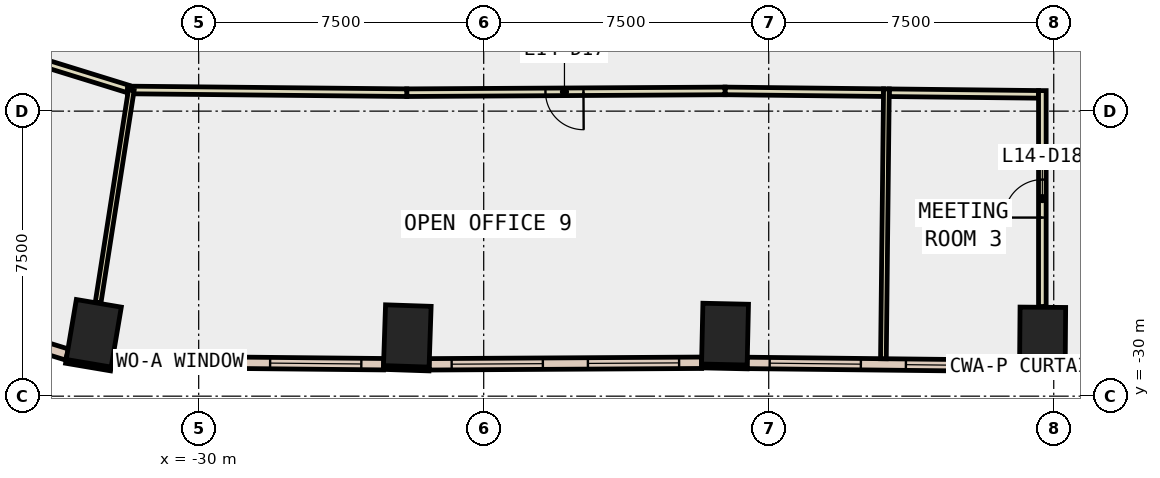
"""IFC4 building model, lengths in metres.
Left out: names, types, materials, properties, quantities, classifications, styles, units other than length and angle.
Written with IfcOpenShell. Run it as: python <this file> out.ifc"""

import sys

from ifc_helpers import new_model, si_unit, direction, frame, frame_2d, origin, origin_2d, place, context, subcontext, project, spatial, rectangle, extrude, element, fill, save


model = new_model("IFC4")
c1 = context("Model", 3, precision=1e-05, world=origin(), true_north=direction((0.0, 1.0)))
c2 = subcontext(c1, "Body", "Model", "MODEL_VIEW")
j1 = project(units=[si_unit("LENGTHUNIT", "METRE"), si_unit("PLANEANGLEUNIT", "RADIAN")], contexts=[c1])
p1 = place(None, origin())
s1 = spatial("IfcSite", under=j1, at=p1, CompositionType="ELEMENT")
p2 = place(p1, origin())
s2 = spatial("IfcBuilding", under=s1, at=p2, CompositionType="ELEMENT")
p3 = place(p2, frame((0.0, 0.0, 68.6)))
s3 = spatial("IfcBuildingStorey", under=s2, at=p3, CompositionType="ELEMENT", Elevation=68.6)
for number, where, z_axis, x_axis in (
    (1, (-32.761, -28.346, -0.4), (0.0, 0.0, 1.0), (-0.986, 0.167, 0.0)),
    (2, (-24.51, -28.416, -0.4), (0.0, 0.0, 1.0), (-0.999, 0.034, 0.0)),
    (3, (-16.15, -28.368, -0.4), (0.0, 0.0, 1.0), (-1.0, 0.022, 0.0)),
    (4, (-7.793, -28.461, -0.4), (0.0, 0.0, 1.0), (-1.0, 0.008, 0.0)),
):
    element("IfcColumn", number, at=place(p3, frame(where, z_axis=z_axis, x_axis=x_axis)), inside=s3, PredefinedType="COLUMN", context=c2, shape_type="SweptSolid", body=[
        extrude(rectangle(XDim=1.2, YDim=1.6, at=origin_2d()), origin(), (0.0, 0.0, 1.0), 4.2),
    ])
for number, where, z_axis, x_axis in (
    (5, (-33.494, -29.084, 0.0), (0.0, 0.0, 1.0), (0.986, -0.167, 0.0)),
    (6, (-25.138, -29.245, 0.0), (0.0, 0.0, 1.0), (0.999, -0.033, 0.0)),
):
    element("IfcWall", number, at=place(p3, frame(where, z_axis=z_axis, x_axis=x_axis)), inside=s3, PredefinedType="STANDARD", context=c2, shape_type="SweptSolid", body=[
        extrude(rectangle(XDim=1.2, YDim=0.1, at=frame_2d((0.6, 0.0))), origin(), (0.0, 0.0, 1.0), 3.8),
    ])
p4 = place(p3, frame((-16.769, -29.205, 0.0), z_axis=(0.0, 0.0, 1.0), x_axis=(0.99976752127, -0.021561618973, 0.0)))
e7 = element("IfcWall", 7, at=p4, inside=s3, PredefinedType="STANDARD", context=c2, shape_type="SweptSolid", body=[
    extrude(rectangle(XDim=1.2, YDim=0.1, at=frame_2d((0.6, 0.0))), origin(), (0.0, 0.0, 1.0), 3.8),
])
p5 = place(p3, frame((-8.4, -29.306, 0.0), z_axis=(0.0, 0.0, 1.0), x_axis=(0.999965208912, -0.008341520563, 0.0)))
e8 = element("IfcWall", 8, at=p5, inside=s3, PredefinedType="STANDARD", context=c2, shape_type="SweptSolid", body=[
    extrude(rectangle(XDim=1.2, YDim=0.1, at=frame_2d((0.6, 0.0))), origin(), (0.0, 0.0, 1.0), 3.8),
])
p6 = place(p3, frame((-32.279, -29.089, 0.0), z_axis=(0.0, 0.0, 1.0), x_axis=(0.999952253205, -0.009771965572, 0.0)))
e9 = element("IfcWall", 9, at=p6, inside=s3, PredefinedType="STANDARD", context=c2, shape_type="SweptSolid", body=[
    extrude(rectangle(XDim=7.145, YDim=0.3, at=frame_2d((3.573, 0.0))), origin(), (0.0, 0.0, 1.0), 3.8),
])
p7 = place(p6, frame((0.586, 0.0, 0.9)))
e10 = element("IfcOpeningElement", 10, at=p7, cuts=e9, PredefinedType="OPENING", context=c2, shape_type="SweptSolid", body=[
    extrude(rectangle(XDim=2.4, YDim=2.6, at=frame_2d((1.2, 1.3))), frame((0.0, 0.16, 0.0), z_axis=(0.0, -1.0, 0.0), x_axis=(1.0, 0.0, 0.0)), (0.0, 0.0, 1.0), 0.32),
])
p8 = place(p6, frame((4.159, 0.0, 0.9)))
e11 = element("IfcOpeningElement", 11, at=p8, cuts=e9, PredefinedType="OPENING", context=c2, shape_type="SweptSolid", body=[
    extrude(rectangle(XDim=2.4, YDim=2.6, at=frame_2d((1.2, 1.3))), frame((0.0, 0.16, 0.0), z_axis=(0.0, -1.0, 0.0), x_axis=(1.0, 0.0, 0.0)), (0.0, 0.0, 1.0), 0.32),
])
p9 = place(p3, frame((-23.936, -29.162, 0.0), z_axis=(0.0, 0.0, 1.0), x_axis=(0.999983638272, 0.005720418525, 0.0)))
e12 = element("IfcWall", 12, at=p9, inside=s3, PredefinedType="STANDARD", context=c2, shape_type="SweptSolid", body=[
    extrude(rectangle(XDim=7.17, YDim=0.3, at=frame_2d((3.585, 0.0))), origin(), (0.0, 0.0, 1.0), 3.8),
])
p10 = place(p9, frame((0.593, 0.0, 0.9)))
e13 = element("IfcOpeningElement", 13, at=p10, cuts=e12, PredefinedType="OPENING", context=c2, shape_type="SweptSolid", body=[
    extrude(rectangle(XDim=2.4, YDim=2.6, at=frame_2d((1.2, 1.3))), frame((0.0, 0.16, 0.0), z_axis=(0.0, -1.0, 0.0), x_axis=(1.0, 0.0, 0.0)), (0.0, 0.0, 1.0), 0.32),
])
p11 = place(p9, frame((4.178, 0.0, 0.9)))
e14 = element("IfcOpeningElement", 14, at=p11, cuts=e12, PredefinedType="OPENING", context=c2, shape_type="SweptSolid", body=[
    extrude(rectangle(XDim=2.4, YDim=2.6, at=frame_2d((1.2, 1.3))), frame((0.0, 0.16, 0.0), z_axis=(0.0, -1.0, 0.0), x_axis=(1.0, 0.0, 0.0)), (0.0, 0.0, 1.0), 0.32),
])
p12 = place(p3, frame((-15.568, -29.125, 0.0), z_axis=(0.0, 0.0, 1.0), x_axis=(0.999939152594, -0.011031369316, 0.0)))
e15 = element("IfcWall", 15, at=p12, inside=s3, PredefinedType="STANDARD", context=c2, shape_type="SweptSolid", body=[
    extrude(rectangle(XDim=7.171, YDim=0.3, at=frame_2d((3.585, 0.0))), origin(), (0.0, 0.0, 1.0), 3.8),
])
p13 = place(p12, frame((0.593, 0.0, 0.9)))
e16 = element("IfcOpeningElement", 16, at=p13, cuts=e15, PredefinedType="OPENING", context=c2, shape_type="SweptSolid", body=[
    extrude(rectangle(XDim=2.4, YDim=2.6, at=frame_2d((1.2, 1.3))), frame((0.0, 0.16, 0.0), z_axis=(0.0, -1.0, 0.0), x_axis=(1.0, 0.0, 0.0)), (0.0, 0.0, 1.0), 0.32),
])
p14 = place(p12, frame((4.178, 0.0, 0.9)))
e17 = element("IfcOpeningElement", 17, at=p14, cuts=e15, PredefinedType="OPENING", context=c2, shape_type="SweptSolid", body=[
    extrude(rectangle(XDim=2.4, YDim=2.6, at=frame_2d((1.2, 1.3))), frame((0.0, 0.16, 0.0), z_axis=(0.0, -1.0, 0.0), x_axis=(1.0, 0.0, 0.0)), (0.0, 0.0, 1.0), 0.32),
])
p15 = place(p3, frame((-37.254, -27.732, 0.0), z_axis=(0.0, 0.0, 1.0), x_axis=(0.955308230541, -0.295611543518, 0.0)))
e18 = element("IfcWall", 18, at=p15, inside=s3, PredefinedType="STANDARD", context=c2, shape_type="SweptSolid", body=[
    extrude(rectangle(XDim=3.968, YDim=0.3, at=frame_2d((1.984, 0.0))), origin(), (0.0, 0.0, 1.0), 3.8),
])
p16 = place(p15, frame((1.284, 0.0, 0.9)))
e19 = element("IfcOpeningElement", 19, at=p16, cuts=e18, PredefinedType="OPENING", context=c2, shape_type="SweptSolid", body=[
    extrude(rectangle(XDim=1.4, YDim=2.6, at=frame_2d((0.7, 1.3))), frame((0.0, 0.16, 0.0), z_axis=(0.0, -1.0, 0.0), x_axis=(1.0, 0.0, 0.0)), (0.0, 0.0, 1.0), 0.32),
])
p17 = place(p3, frame((-31.868, -21.914, 0.0), z_axis=(0.0, 0.0, 1.0), x_axis=(-0.955329505989, 0.295542780299, 0.0)))
e20 = element("IfcWall", 20, at=p17, inside=s3, PredefinedType="PARTITIONING", context=c2, shape_type="SweptSolid", body=[
    extrude(rectangle(XDim=2.484, YDim=0.2, at=frame_2d((1.242, 0.0))), origin(), (0.0, 0.0, 1.0), 3.8),
])
p18 = place(p3, frame((-11.979, -22.014, 0.0), z_axis=(0.0, 0.0, 1.0), x_axis=(-0.999939456554, 0.01100378236, 0.0)))
e21 = element("IfcWall", 21, at=p18, inside=s3, PredefinedType="PARTITIONING", context=c2, shape_type="SweptSolid", body=[
    extrude(rectangle(XDim=4.171, YDim=0.2, at=frame_2d((2.085, 0.0))), origin(), (0.0, 0.0, 1.0), 3.8),
])
p19 = place(p3, frame((-16.15, -21.968, 0.0), z_axis=(0.0, 0.0, 1.0), x_axis=(-0.99998433708, -0.00559692726, 0.0)))
e22 = element("IfcWall", 22, at=p19, inside=s3, PredefinedType="PARTITIONING", context=c2, shape_type="SweptSolid", body=[
    extrude(rectangle(XDim=8.375, YDim=0.2, at=frame_2d((4.188, 0.0))), origin(), (0.0, 0.0, 1.0), 3.8),
])
p20 = place(p19, frame((3.725, 0.0, 0.0)))
e23 = element("IfcOpeningElement", 23, at=p20, cuts=e22, PredefinedType="OPENING", context=c2, shape_type="SweptSolid", body=[
    extrude(rectangle(XDim=1.0, YDim=2.1, at=frame_2d((0.5, 1.05))), frame((0.0, 0.11, 0.0), z_axis=(0.0, -1.0, 0.0), x_axis=(1.0, 0.0, 0.0)), (0.0, 0.0, 1.0), 0.22),
])
p21 = place(p3, frame((-24.525, -22.015, 0.0), z_axis=(0.0, 0.0, 1.0), x_axis=(-0.999952295614, 0.009767624922, 0.0)))
e24 = element("IfcWall", 24, at=p21, inside=s3, PredefinedType="PARTITIONING", context=c2, shape_type="SweptSolid", body=[
    extrude(rectangle(XDim=7.348, YDim=0.2, at=frame_2d((3.674, 0.0))), origin(), (0.0, 0.0, 1.0), 3.8),
])
p22 = place(p3, frame((-7.9, -22.059, 0.0), z_axis=(0.0, 0.0, 1.0), x_axis=(-0.999940210022, 0.010935098606, 0.0)))
e25 = element("IfcWall", 25, at=p22, inside=s3, PredefinedType="PARTITIONING", context=c2, shape_type="SweptSolid", body=[
    extrude(rectangle(XDim=3.929, YDim=0.2, at=frame_2d((1.965, 0.0))), origin(), (0.0, 0.0, 1.0), 3.8),
])
p23 = place(p3, frame((-7.8, -27.641, 0.0), z_axis=(0.0, 0.0, 1.0), x_axis=(0.0, 1.0, 0.0)))
e26 = element("IfcWall", 26, at=p23, inside=s3, PredefinedType="PARTITIONING", context=c2, shape_type="SweptSolid", body=[
    extrude(rectangle(XDim=5.681, YDim=0.2, at=frame_2d((2.841, 0.0))), origin(), (0.0, 0.0, 1.0), 3.8),
])
p24 = place(p23, frame((2.34, 0.0, 0.0)))
e27 = element("IfcOpeningElement", 27, at=p24, cuts=e26, PredefinedType="OPENING", context=c2, shape_type="SweptSolid", body=[
    extrude(rectangle(XDim=1.0, YDim=2.1, at=frame_2d((0.5, 1.05))), frame((0.0, 0.11, 0.0), z_axis=(0.0, -1.0, 0.0), x_axis=(1.0, 0.0, 0.0)), (0.0, 0.0, 1.0), 0.22),
])
p25 = place(p3, frame((-31.773, -21.944, 0.0), z_axis=(0.0, 0.0, 1.0), x_axis=(-0.154313693693, -0.988021904585, 0.0)))
e28 = element("IfcWall", 28, at=p25, inside=s3, PredefinedType="PARTITIONING", context=c2, shape_type="SweptSolid", body=[
    extrude(rectangle(XDim=5.658, YDim=0.15, at=frame_2d((2.829, 0.0))), origin(), (0.0, 0.0, 1.0), 3.8),
])
p26 = place(p3, frame((-11.903, -21.915, 0.0), z_axis=(0.0, 0.0, 1.0), x_axis=(-0.011106223261, -0.999938324, 0.0)))
e29 = element("IfcWall", 29, at=p26, inside=s3, PredefinedType="PARTITIONING", context=c2, shape_type="SweptSolid", body=[
    extrude(rectangle(XDim=7.1, YDim=0.15, at=frame_2d((3.55, 0.0))), origin(), (0.0, 0.0, 1.0), 3.8),
])
p27 = place(p7, origin())
e30 = element("IfcWindow", 30, at=p27, inside=s3, PartitioningType="SINGLE_PANEL", PredefinedType="WINDOW", context=c2, shape_type="SweptSolid", body=[
    extrude(rectangle(XDim=2.4, YDim=2.6, at=frame_2d((1.2, 1.3))), frame((0.0, 0.03, 0.0), z_axis=(0.0, -1.0, 0.0), x_axis=(1.0, 0.0, 0.0)), (0.0, 0.0, 1.0), 0.06),
])
fill(e10, e30)
p28 = place(p8, origin())
e31 = element("IfcWindow", 31, at=p28, inside=s3, PartitioningType="SINGLE_PANEL", PredefinedType="WINDOW", context=c2, shape_type="SweptSolid", body=[
    extrude(rectangle(XDim=2.4, YDim=2.6, at=frame_2d((1.2, 1.3))), frame((0.0, 0.03, 0.0), z_axis=(0.0, -1.0, 0.0), x_axis=(1.0, 0.0, 0.0)), (0.0, 0.0, 1.0), 0.06),
])
fill(e11, e31)
p29 = place(p10, origin())
e32 = element("IfcWindow", 32, at=p29, inside=s3, PartitioningType="SINGLE_PANEL", PredefinedType="WINDOW", context=c2, shape_type="SweptSolid", body=[
    extrude(rectangle(XDim=2.4, YDim=2.6, at=frame_2d((1.2, 1.3))), frame((0.0, 0.03, 0.0), z_axis=(0.0, -1.0, 0.0), x_axis=(1.0, 0.0, 0.0)), (0.0, 0.0, 1.0), 0.06),
])
fill(e13, e32)
p30 = place(p11, origin())
e33 = element("IfcWindow", 33, at=p30, inside=s3, PartitioningType="SINGLE_PANEL", PredefinedType="WINDOW", context=c2, shape_type="SweptSolid", body=[
    extrude(rectangle(XDim=2.4, YDim=2.6, at=frame_2d((1.2, 1.3))), frame((0.0, 0.03, 0.0), z_axis=(0.0, -1.0, 0.0), x_axis=(1.0, 0.0, 0.0)), (0.0, 0.0, 1.0), 0.06),
])
fill(e14, e33)
p31 = place(p13, origin())
e34 = element("IfcWindow", 34, at=p31, inside=s3, PartitioningType="SINGLE_PANEL", PredefinedType="WINDOW", context=c2, shape_type="SweptSolid", body=[
    extrude(rectangle(XDim=2.4, YDim=2.6, at=frame_2d((1.2, 1.3))), frame((0.0, 0.03, 0.0), z_axis=(0.0, -1.0, 0.0), x_axis=(1.0, 0.0, 0.0)), (0.0, 0.0, 1.0), 0.06),
])
fill(e16, e34)
p32 = place(p14, origin())
e35 = element("IfcWindow", 35, at=p32, inside=s3, PartitioningType="SINGLE_PANEL", PredefinedType="WINDOW", context=c2, shape_type="SweptSolid", body=[
    extrude(rectangle(XDim=2.4, YDim=2.6, at=frame_2d((1.2, 1.3))), frame((0.0, 0.03, 0.0), z_axis=(0.0, -1.0, 0.0), x_axis=(1.0, 0.0, 0.0)), (0.0, 0.0, 1.0), 0.06),
])
fill(e17, e35)
p33 = place(p20, origin())
e36 = element("IfcDoor", 36, at=p33, inside=s3, OperationType="SINGLE_SWING_RIGHT", PredefinedType="DOOR", context=c2, shape_type="SweptSolid", body=[
    extrude(rectangle(XDim=1.0, YDim=2.1, at=frame_2d((0.5, 1.05))), frame((0.0, 0.025, 0.0), z_axis=(0.0, -1.0, 0.0), x_axis=(1.0, 0.0, 0.0)), (0.0, 0.0, 1.0), 0.05),
])
fill(e23, e36)
p34 = place(p24, origin())
e37 = element("IfcDoor", 37, at=p34, inside=s3, OperationType="SINGLE_SWING_LEFT", PredefinedType="DOOR", context=c2, shape_type="SweptSolid", body=[
    extrude(rectangle(XDim=1.0, YDim=2.1, at=frame_2d((0.5, 1.05))), frame((0.0, 0.025, 0.0), z_axis=(0.0, -1.0, 0.0), x_axis=(1.0, 0.0, 0.0)), (0.0, 0.0, 1.0), 0.05),
])
fill(e27, e37)
save(model, sys.argv[1])
